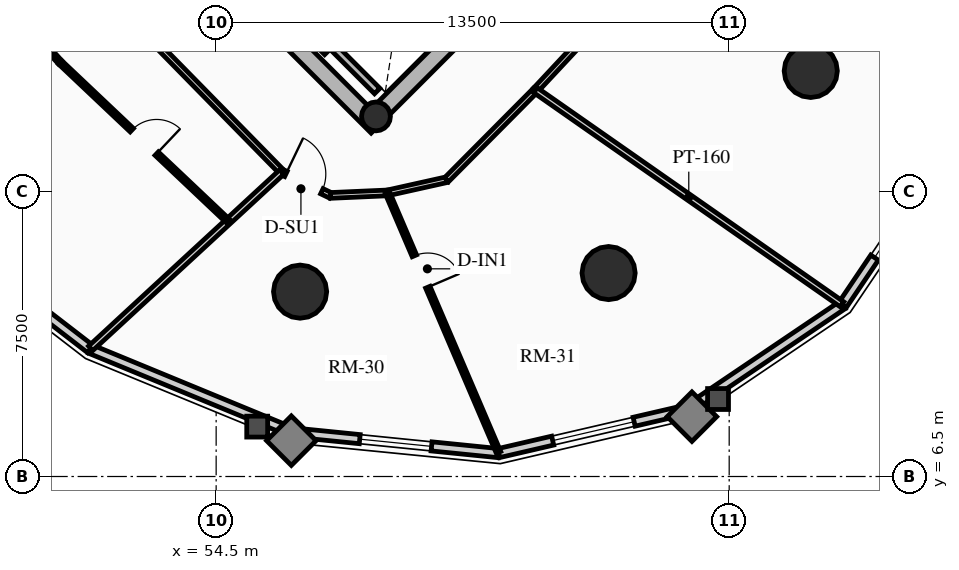
"""IFC4 building model, lengths in metres.
Left out: names, types, materials, properties, quantities, classifications, styles, units other than length and angle.
Written with IfcOpenShell. Run it as: python <this file> out.ifc"""

import sys

from ifc_helpers import new_model, si_unit, direction, frame, frame_2d, origin, origin_2d, place, context, subcontext, project, spatial, rectangle, circle, hollow_circle, extrude, source, transform, mapped, element, fill, save


model = new_model("IFC4")
c1 = context("Model", 3, precision=1e-05, world=origin(), true_north=direction((0.0, 1.0)))
c2 = subcontext(c1, "Body", "Model", "MODEL_VIEW")
j1 = project(units=[si_unit("LENGTHUNIT", "METRE"), si_unit("PLANEANGLEUNIT", "RADIAN")], contexts=[c1])
p1 = place(None, origin())
s1 = spatial("IfcSite", under=j1, at=p1, CompositionType="ELEMENT")
p2 = place(p1, origin())
s2 = spatial("IfcBuilding", under=s1, at=p2, CompositionType="ELEMENT")
p3 = place(p2, frame((0.0, 0.0, 119.62)))
s3 = spatial("IfcBuildingStorey", under=s2, at=p3, CompositionType="ELEMENT", Elevation=119.62)
p4 = place(p3, frame((58.737, 15.697, 0.0), z_axis=(0.0, 0.0, 1.0), x_axis=(-0.707106781187, 0.707106781187, 0.0)))
e1 = element("IfcWall", 1, at=p4, inside=s3, PredefinedType="SHEAR", context=c2, shape_type="SweptSolid", body=[
    extrude(rectangle(XDim=14.2, YDim=0.45, at=frame_2d((7.1, 0.0))), origin(), (0.0, 0.0, 1.0), 2.91),
])
p5 = place(p3, frame((58.578, 15.856, 0.0), z_axis=(0.0, 0.0, 1.0), x_axis=(0.707106781187, 0.707106781187, 0.0)))
e2 = element("IfcWall", 2, at=p5, inside=s3, PredefinedType="SHEAR", context=c2, shape_type="SweptSolid", body=[
    extrude(rectangle(XDim=10.7, YDim=0.45, at=frame_2d((5.35, 0.0))), origin(), (0.0, 0.0, 1.0), 2.91),
])
m1 = source(origin(), c2, "Body", "SweptSolid", [
    extrude(rectangle(XDim=1.5, YDim=2.02, at=frame_2d((0.75, 1.01))), frame((0.0, 0.235, 0.0), z_axis=(0.0, -1.0, 0.0), x_axis=(1.0, 0.0, 0.0)), (0.0, 0.0, 1.0), 0.47),
])
p6 = place(p5, frame((5.45, 0.0, 0.0)))
e3 = element("IfcOpeningElement", 3, at=p6, cuts=e2, PredefinedType="OPENING", context=c2, shape_type="MappedRepresentation", body=[
    mapped(m1, transform((0.0, 0.0, 0.0), x_axis=(1.0, 0.0, 0.0), y_axis=(0.0, 1.0, 0.0), z_axis=(0.0, 0.0, 1.0), scale=1.0)),
])
p7 = place(p3, frame((58.706, 15.976, 0.0), z_axis=(0.0, 0.0, 1.0), x_axis=(0.707106781187, 0.707106781187, 0.0)))
e4 = element("IfcColumn", 4, at=p7, inside=s3, PredefinedType="COLUMN", context=c2, shape_type="SweptSolid", body=[
    extrude(hollow_circle(Radius=0.38, WallThickness=0.032, at=origin_2d()), origin(), (0.0, 0.0, 1.0), 2.91),
])
for number, where, z_axis, x_axis in (
    (5, (56.709, 11.365, 0.0), (0.0, 0.0, 1.0), (1.0, 0.0, 0.0)),
    (6, (64.827, 11.854, 0.0), (0.0, 0.0, 1.0), (1.0, 0.0, 0.0)),
    (7, (70.146, 17.173, 0.0), (0.0, 0.0, 1.0), (1.0, 0.0, 0.0)),
):
    element("IfcColumn", number, at=place(p3, frame(where, z_axis=z_axis, x_axis=x_axis)), inside=s3, PredefinedType="USERDEFINED", context=c2, shape_type="SweptSolid", body=[
        extrude(circle(Radius=0.7, at=origin_2d()), origin(), (0.0, 0.0, 1.0), 2.91),
    ])
p8 = place(p3, frame((51.189, 9.855, 0.0), z_axis=(0.0, 0.0, 1.0), x_axis=(-0.791982052206, 0.61054437102, 0.0)))
e8 = element("IfcWall", 8, at=p8, inside=s3, PredefinedType="SOLIDWALL", context=c2, shape_type="SweptSolid", body=[
    extrude(rectangle(XDim=5.942, YDim=0.24, at=frame_2d((2.971, 0.0))), origin(), (0.0, 0.0, 1.0), 2.179),
])
m2 = source(origin(), c2, "Body", "SweptSolid", [
    extrude(rectangle(XDim=2.2, YDim=1.35, at=frame_2d((1.1, 0.675))), frame((0.0, 0.13, 0.0), z_axis=(0.0, -1.0, 0.0), x_axis=(1.0, 0.0, 0.0)), (0.0, 0.0, 1.0), 0.26),
])
p9 = place(p8, frame((1.871, 0.0, 0.65)))
e9 = element("IfcOpeningElement", 9, at=p9, cuts=e8, PredefinedType="OPENING", context=c2, shape_type="MappedRepresentation", body=[
    mapped(m2, transform((0.0, 0.0, 0.0), x_axis=(1.0, 0.0, 0.0), y_axis=(0.0, 1.0, 0.0), z_axis=(0.0, 0.0, 1.0), scale=1.0)),
])
p10 = place(p3, frame((56.513, 7.661, 0.0), z_axis=(0.0, 0.0, 1.0), x_axis=(-0.924563909604, 0.381027003055, 0.0)))
e10 = element("IfcWall", 10, at=p10, inside=s3, PredefinedType="SOLIDWALL", context=c2, shape_type="SweptSolid", body=[
    extrude(rectangle(XDim=5.758, YDim=0.24, at=frame_2d((2.879, 0.0))), origin(), (0.0, 0.0, 1.0), 2.179),
])
p11 = place(p3, frame((61.933, 7.115, 0.0), z_axis=(0.0, 0.0, 1.0), x_axis=(-0.994971754311, 0.10015591906, 0.0)))
e11 = element("IfcWall", 11, at=p11, inside=s3, PredefinedType="SOLIDWALL", context=c2, shape_type="SweptSolid", body=[
    extrude(rectangle(XDim=5.448, YDim=0.24, at=frame_2d((2.724, 0.0))), origin(), (0.0, 0.0, 1.0), 2.179),
])
m3 = source(origin(), c2, "Body", "SweptSolid", [
    extrude(rectangle(XDim=1.9, YDim=1.35, at=frame_2d((0.95, 0.675))), frame((0.0, 0.13, 0.0), z_axis=(0.0, -1.0, 0.0), x_axis=(1.0, 0.0, 0.0)), (0.0, 0.0, 1.0), 0.26),
])
p12 = place(p11, frame((1.774, 0.0, 0.65)))
e12 = element("IfcOpeningElement", 12, at=p12, cuts=e11, PredefinedType="OPENING", context=c2, shape_type="MappedRepresentation", body=[
    mapped(m3, transform((0.0, 0.0, 0.0), x_axis=(1.0, 0.0, 0.0), y_axis=(0.0, 1.0, 0.0), z_axis=(0.0, 0.0, 1.0), scale=1.0)),
])
p13 = place(p3, frame((66.92, 8.271, 0.0), z_axis=(0.0, 0.0, 1.0), x_axis=(-0.974165631126, -0.225834725257, 0.0)))
e13 = element("IfcWall", 13, at=p13, inside=s3, PredefinedType="SOLIDWALL", context=c2, shape_type="SweptSolid", body=[
    extrude(rectangle(XDim=5.119, YDim=0.24, at=frame_2d((2.56, 0.0))), origin(), (0.0, 0.0, 1.0), 2.179),
])
p14 = place(p13, frame((1.459, 0.0, 0.65)))
e14 = element("IfcOpeningElement", 14, at=p14, cuts=e13, PredefinedType="OPENING", context=c2, shape_type="MappedRepresentation", body=[
    mapped(m2, transform((0.0, 0.0, 0.0), x_axis=(1.0, 0.0, 0.0), y_axis=(0.0, 1.0, 0.0), z_axis=(0.0, 0.0, 1.0), scale=1.0)),
])
p15 = place(p3, frame((70.985, 11.015, 0.0), z_axis=(0.0, 0.0, 1.0), x_axis=(-0.828781148131, -0.559572880421, 0.0)))
e15 = element("IfcWall", 15, at=p15, inside=s3, PredefinedType="SOLIDWALL", context=c2, shape_type="SweptSolid", body=[
    extrude(rectangle(XDim=4.905, YDim=0.24, at=frame_2d((2.452, 0.0))), origin(), (0.0, 0.0, 1.0), 2.179),
])
p16 = place(p3, frame((73.729, 15.08, 0.0), z_axis=(0.0, 0.0, 1.0), x_axis=(-0.559572880421, -0.828781148131, 0.0)))
e16 = element("IfcWall", 16, at=p16, inside=s3, PredefinedType="SOLIDWALL", context=c2, shape_type="SweptSolid", body=[
    extrude(rectangle(XDim=4.905, YDim=0.24, at=frame_2d((2.452, 0.0))), origin(), (0.0, 0.0, 1.0), 2.179),
])
p17 = place(p16, frame((1.502, 0.0, 0.65)))
e17 = element("IfcOpeningElement", 17, at=p17, cuts=e16, PredefinedType="OPENING", context=c2, shape_type="MappedRepresentation", body=[
    mapped(m3, transform((0.0, 0.0, 0.0), x_axis=(1.0, 0.0, 0.0), y_axis=(0.0, 1.0, 0.0), z_axis=(0.0, 0.0, 1.0), scale=1.0)),
])
p18 = place(p3, frame((57.284, 17.673, 0.0), z_axis=(0.0, 0.0, 1.0), x_axis=(0.707147878904, 0.70706568108, 0.0)))
e18 = element("IfcWall", 18, at=p18, inside=s3, PredefinedType="SHEAR", context=c2, shape_type="SweptSolid", body=[
    extrude(rectangle(XDim=2.97, YDim=0.2, at=frame_2d((1.485, 0.0))), origin(), (0.0, 0.0, 1.0), 2.91),
])
p19 = place(p3, frame((58.737, 16.644, 0.0), z_axis=(0.0, 0.0, 1.0), x_axis=(-0.707032117043, 0.707181437447, 0.0)))
e19 = element("IfcWall", 19, at=p19, inside=s3, PredefinedType="SHEAR", context=c2, shape_type="SweptSolid", body=[
    extrude(rectangle(XDim=1.635, YDim=0.2, at=frame_2d((0.817, 0.0))), origin(), (0.0, 0.0, 1.0), 2.91),
])
p20 = place(p3, frame((51.914, 18.914, 0.0), z_axis=(0.0, 0.0, 1.0), x_axis=(0.699999313799, -0.714143515465, 0.0)))
e20 = element("IfcWall", 20, at=p20, inside=s3, PredefinedType="PARTITIONING", context=c2, shape_type="SweptSolid", body=[
    extrude(rectangle(XDim=6.162, YDim=0.15, at=frame_2d((3.081, 0.0))), origin(), (0.0, 0.0, 1.0), 2.225),
])
p21 = place(p3, frame((56.227, 14.513, 0.0), z_axis=(0.0, 0.0, 1.0), x_axis=(0.901477579283, -0.432825801044, 0.0)))
e21 = element("IfcWall", 21, at=p21, inside=s3, PredefinedType="PARTITIONING", context=c2, shape_type="SweptSolid", body=[
    extrude(rectangle(XDim=1.424, YDim=0.15, at=frame_2d((0.712, 0.0))), origin(), (0.0, 0.0, 1.0), 2.225),
])
m4 = source(origin(), c2, "Body", "SweptSolid", [
    extrude(rectangle(XDim=1.05, YDim=2.015, at=frame_2d((0.525, 1.007))), frame((0.0, 0.085, 0.0), z_axis=(0.0, -1.0, 0.0), x_axis=(1.0, 0.0, 0.0)), (0.0, 0.0, 1.0), 0.17),
])
p22 = place(p21, frame((0.12, 0.0, 0.0)))
e22 = element("IfcOpeningElement", 22, at=p22, cuts=e21, PredefinedType="OPENING", context=c2, shape_type="MappedRepresentation", body=[
    mapped(m4, transform((0.0, 0.0, 0.0), x_axis=(1.0, 0.0, 0.0), y_axis=(0.0, 1.0, 0.0), z_axis=(0.0, 0.0, 1.0), scale=1.0)),
])
p23 = place(p3, frame((57.511, 13.897, 0.0), z_axis=(0.0, 0.0, 1.0), x_axis=(0.999024538494, 0.044158481476, 0.0)))
e23 = element("IfcWall", 23, at=p23, inside=s3, PredefinedType="PARTITIONING", context=c2, shape_type="SweptSolid", body=[
    extrude(rectangle(XDim=1.498, YDim=0.15, at=frame_2d((0.749, 0.0))), origin(), (0.0, 0.0, 1.0), 2.225),
])
p24 = place(p3, frame((59.008, 13.963, 0.0), z_axis=(0.0, 0.0, 1.0), x_axis=(0.976020856791, 0.21767702476, 0.0)))
e24 = element("IfcWall", 24, at=p24, inside=s3, PredefinedType="PARTITIONING", context=c2, shape_type="SweptSolid", body=[
    extrude(rectangle(XDim=1.593, YDim=0.15, at=frame_2d((0.796, 0.0))), origin(), (0.0, 0.0, 1.0), 2.225),
])
p25 = place(p3, frame((60.562, 14.31, 0.0), z_axis=(0.0, 0.0, 1.0), x_axis=(0.704566236161, 0.709638230975, 0.0)))
e25 = element("IfcWall", 25, at=p25, inside=s3, PredefinedType="PARTITIONING", context=c2, shape_type="SweptSolid", body=[
    extrude(rectangle(XDim=3.321, YDim=0.15, at=frame_2d((1.661, 0.0))), origin(), (0.0, 0.0, 1.0), 2.225),
])
p26 = place(p3, frame((62.903, 16.667, 0.0), z_axis=(0.0, 0.0, 1.0), x_axis=(0.682371947497, 0.731005147225, 0.0)))
e26 = element("IfcWall", 26, at=p26, inside=s3, PredefinedType="PARTITIONING", context=c2, shape_type="SweptSolid", body=[
    extrude(rectangle(XDim=6.642, YDim=0.15, at=frame_2d((3.321, 0.0))), origin(), (0.0, 0.0, 1.0), 2.225),
])
p27 = place(p3, frame((56.227, 14.513, 0.0), z_axis=(0.0, 0.0, 1.0), x_axis=(-0.734951144322, -0.678120059768, 0.0)))
e27 = element("IfcWall", 27, at=p27, inside=s3, PredefinedType="PARTITIONING", context=c2, shape_type="SweptSolid", body=[
    extrude(rectangle(XDim=6.843, YDim=0.16, at=frame_2d((3.422, 0.0))), origin(), (0.0, 0.0, 1.0), 2.179),
])
p28 = place(p3, frame((62.903, 16.667, 0.0), z_axis=(0.0, 0.0, 1.0), x_axis=(0.819735047612, -0.572742919395, 0.0)))
e28 = element("IfcWall", 28, at=p28, inside=s3, PredefinedType="PARTITIONING", context=c2, shape_type="SweptSolid", body=[
    extrude(rectangle(XDim=9.842, YDim=0.16, at=frame_2d((4.921, 0.0))), origin(), (0.0, 0.0, 1.0), 2.179),
])
p29 = place(p3, frame((46.352, 21.838, 0.0), z_axis=(0.0, 0.0, 1.0), x_axis=(0.673416949194, -0.739262884594, 0.0)))
e29 = element("IfcWall", 29, at=p29, inside=s3, PredefinedType="PARTITIONING", context=c2, shape_type="SweptSolid", body=[
    extrude(rectangle(XDim=6.007, YDim=0.125, at=frame_2d((3.003, 0.0))), origin(), (0.0, 0.0, 1.0), 2.655),
])
p30 = place(p3, frame((50.397, 17.397, 0.0), z_axis=(0.0, 0.0, 1.0), x_axis=(0.726427828833, -0.687242758781, 0.0)))
e30 = element("IfcWall", 30, at=p30, inside=s3, PredefinedType="PARTITIONING", context=c2, shape_type="SweptSolid", body=[
    extrude(rectangle(XDim=6.087, YDim=0.125, at=frame_2d((3.043, 0.0))), origin(), (0.0, 0.0, 1.0), 2.225),
])
m5 = source(origin(), c2, "Body", "SweptSolid", [
    extrude(rectangle(XDim=0.9, YDim=2.005, at=frame_2d((0.45, 1.002))), frame((0.0, 0.073, 0.0), z_axis=(0.0, -1.0, 0.0), x_axis=(1.0, 0.0, 0.0)), (0.0, 0.0, 1.0), 0.145),
])
p31 = place(p30, frame((2.594, 0.0, 0.0)))
e31 = element("IfcOpeningElement", 31, at=p31, cuts=e30, PredefinedType="OPENING", context=c2, shape_type="MappedRepresentation", body=[
    mapped(m5, transform((0.0, 0.0, 0.0), x_axis=(1.0, 0.0, 0.0), y_axis=(0.0, 1.0, 0.0), z_axis=(0.0, 0.0, 1.0), scale=1.0)),
])
p32 = place(p3, frame((59.008, 13.963, 0.0), z_axis=(0.0, 0.0, 1.0), x_axis=(0.393439207333, -0.919350635032, 0.0)))
e32 = element("IfcWall", 32, at=p32, inside=s3, PredefinedType="PARTITIONING", context=c2, shape_type="SweptSolid", body=[
    extrude(rectangle(XDim=7.427, YDim=0.125, at=frame_2d((3.713, 0.0))), origin(), (0.0, 0.0, 1.0), 2.179),
])
p33 = place(p32, frame((1.8, 0.0, 0.0)))
e33 = element("IfcOpeningElement", 33, at=p33, cuts=e32, PredefinedType="OPENING", context=c2, shape_type="MappedRepresentation", body=[
    mapped(m5, transform((0.0, 0.0, 0.0), x_axis=(1.0, 0.0, 0.0), y_axis=(0.0, 1.0, 0.0), z_axis=(0.0, 0.0, 1.0), scale=1.0)),
])
m6 = source(origin(), c2, "Body", "SweptSolid", [
    extrude(rectangle(XDim=1.9, YDim=1.35, at=frame_2d((0.95, 0.675))), frame((0.0, 0.03, 0.0), z_axis=(0.0, -1.0, 0.0), x_axis=(1.0, 0.0, 0.0)), (0.0, 0.0, 1.0), 0.06),
])
p34 = place(p12, origin())
e34 = element("IfcWindow", 34, at=p34, inside=s3, PartitioningType="DOUBLE_PANEL_VERTICAL", PredefinedType="WINDOW", context=c2, shape_type="MappedRepresentation", body=[
    mapped(m6, transform((0.0, 0.0, 0.0), x_axis=(1.0, 0.0, 0.0), y_axis=(0.0, 1.0, 0.0), z_axis=(0.0, 0.0, 1.0), scale=1.0)),
])
fill(e12, e34)
m7 = source(origin(), c2, "Body", "SweptSolid", [
    extrude(rectangle(XDim=2.2, YDim=1.35, at=frame_2d((1.1, 0.675))), frame((0.0, 0.03, 0.0), z_axis=(0.0, -1.0, 0.0), x_axis=(1.0, 0.0, 0.0)), (0.0, 0.0, 1.0), 0.06),
])
p35 = place(p14, origin())
e35 = element("IfcWindow", 35, at=p35, inside=s3, PartitioningType="DOUBLE_PANEL_VERTICAL", PredefinedType="WINDOW", context=c2, shape_type="MappedRepresentation", body=[
    mapped(m7, transform((0.0, 0.0, 0.0), x_axis=(1.0, 0.0, 0.0), y_axis=(0.0, 1.0, 0.0), z_axis=(0.0, 0.0, 1.0), scale=1.0)),
])
fill(e14, e35)
p36 = place(p17, origin())
e36 = element("IfcWindow", 36, at=p36, inside=s3, PartitioningType="DOUBLE_PANEL_VERTICAL", PredefinedType="WINDOW", context=c2, shape_type="MappedRepresentation", body=[
    mapped(m6, transform((0.0, 0.0, 0.0), x_axis=(1.0, 0.0, 0.0), y_axis=(0.0, 1.0, 0.0), z_axis=(0.0, 0.0, 1.0), scale=1.0)),
])
fill(e17, e36)
m8 = source(origin(), c2, "Body", "SweptSolid", [
    extrude(rectangle(XDim=0.9, YDim=2.005, at=frame_2d((0.45, 1.002))), frame((0.0, 0.025, 0.0), z_axis=(0.0, -1.0, 0.0), x_axis=(1.0, 0.0, 0.0)), (0.0, 0.0, 1.0), 0.05),
])
p37 = place(p31, origin())
e37 = element("IfcDoor", 37, at=p37, inside=s3, OperationType="SINGLE_SWING_RIGHT", PredefinedType="DOOR", context=c2, shape_type="MappedRepresentation", body=[
    mapped(m8, transform((0.0, 0.0, 0.0), x_axis=(1.0, 0.0, 0.0), y_axis=(0.0, 1.0, 0.0), z_axis=(0.0, 0.0, 1.0), scale=1.0)),
])
fill(e31, e37)
m9 = source(origin(), c2, "Body", "SweptSolid", [
    extrude(rectangle(XDim=1.05, YDim=2.015, at=frame_2d((0.525, 1.007))), frame((0.0, 0.025, 0.0), z_axis=(0.0, -1.0, 0.0), x_axis=(1.0, 0.0, 0.0)), (0.0, 0.0, 1.0), 0.05),
])
p38 = place(p22, origin())
e38 = element("IfcDoor", 38, at=p38, inside=s3, OperationType="SINGLE_SWING_LEFT", PredefinedType="DOOR", context=c2, shape_type="MappedRepresentation", body=[
    mapped(m9, transform((0.0, 0.0, 0.0), x_axis=(1.0, 0.0, 0.0), y_axis=(0.0, 1.0, 0.0), z_axis=(0.0, 0.0, 1.0), scale=1.0)),
])
fill(e22, e38)
p39 = place(p33, origin())
e39 = element("IfcDoor", 39, at=p39, inside=s3, OperationType="SINGLE_SWING_RIGHT", PredefinedType="DOOR", context=c2, shape_type="MappedRepresentation", body=[
    mapped(m8, transform((0.0, 0.0, 0.0), x_axis=(1.0, 0.0, 0.0), y_axis=(0.0, 1.0, 0.0), z_axis=(0.0, 0.0, 1.0), scale=1.0)),
])
fill(e33, e39)
save(model, sys.argv[1])
